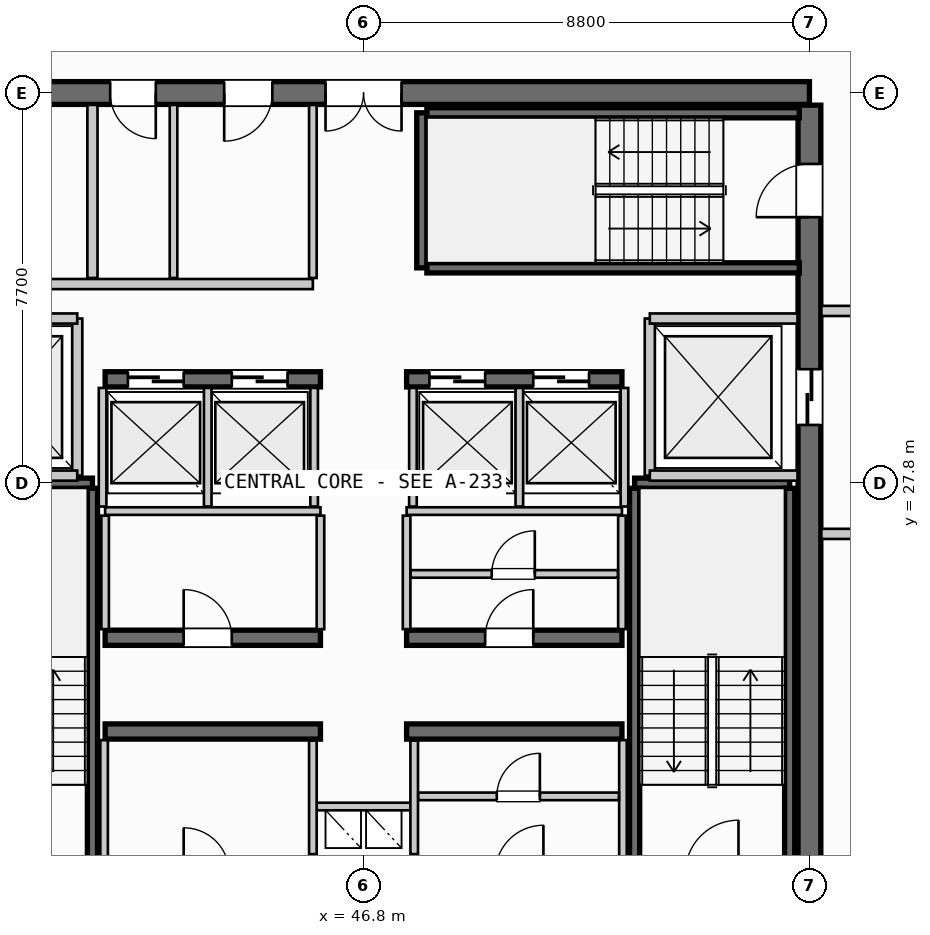
"""IFC4 building model, lengths in metres.
Left out: names, types, materials, properties, quantities, classifications, styles, units other than length and angle.
Written with IfcOpenShell. Run it as: python <this file> out.ifc"""

import sys

from ifc_helpers import new_model, si_unit, direction, frame, frame_2d, origin, place, context, subcontext, project, spatial, rectangle, extrude, source, transform, mapped, element, fill, save


model = new_model("IFC4")
c1 = context("Model", 3, precision=1e-05, world=origin(), true_north=direction((0.0, 1.0)))
c2 = subcontext(c1, "Body", "Model", "MODEL_VIEW")
j1 = project(units=[si_unit("LENGTHUNIT", "METRE"), si_unit("PLANEANGLEUNIT", "RADIAN")], contexts=[c1])
p1 = place(None, origin())
s1 = spatial("IfcSite", under=j1, at=p1, CompositionType="ELEMENT")
p2 = place(p1, origin())
s2 = spatial("IfcBuilding", under=s1, at=p2, CompositionType="ELEMENT")
p3 = place(p2, frame((0.0, 0.0, 238.75)))
s3 = spatial("IfcBuildingStorey", under=s2, at=p3, CompositionType="ELEMENT", Elevation=238.75)
p4 = place(p3, frame((55.6, 35.5, 0.0), z_axis=(0.0, 0.0, 1.0), x_axis=(-1.0, 0.0, 0.0)))
e1 = element("IfcWall", 1, at=p4, inside=s3, PredefinedType="SHEAR", context=c2, shape_type="SweptSolid", body=[
    extrude(rectangle(XDim=17.6, YDim=0.45, at=frame_2d((8.8, 0.0))), origin(), (0.0, 0.0, 1.0), 3.21),
])
p5 = place(p4, frame((8.05, 0.0, 0.0)))
e2 = element("IfcOpeningElement", 2, at=p5, cuts=e1, PredefinedType="OPENING", context=c2, shape_type="SweptSolid", body=[
    extrude(rectangle(XDim=1.5, YDim=2.2, at=frame_2d((0.75, 1.1))), frame((0.0, 0.235, 0.0), z_axis=(0.0, -1.0, 0.0), x_axis=(1.0, 0.0, 0.0)), (0.0, 0.0, 1.0), 0.47),
])
p6 = place(p4, frame((15.1, 0.0, 0.0)))
e3 = element("IfcOpeningElement", 3, at=p6, cuts=e1, PredefinedType="OPENING", context=c2, shape_type="SweptSolid", body=[
    extrude(rectangle(XDim=0.95, YDim=2.15, at=frame_2d((0.475, 1.075))), frame((0.0, 0.235, 0.0), z_axis=(0.0, -1.0, 0.0), x_axis=(1.0, 0.0, 0.0)), (0.0, 0.0, 1.0), 0.47),
])
p7 = place(p4, frame((12.9, 0.0, 0.0)))
e4 = element("IfcOpeningElement", 4, at=p7, cuts=e1, PredefinedType="OPENING", context=c2, shape_type="SweptSolid", body=[
    extrude(rectangle(XDim=0.9, YDim=2.15, at=frame_2d((0.45, 1.075))), frame((0.0, 0.235, 0.0), z_axis=(0.0, -1.0, 0.0), x_axis=(1.0, 0.0, 0.0)), (0.0, 0.0, 1.0), 0.47),
])
p8 = place(p4, frame((10.6, 0.0, 0.0)))
e5 = element("IfcOpeningElement", 5, at=p8, cuts=e1, PredefinedType="OPENING", context=c2, shape_type="SweptSolid", body=[
    extrude(rectangle(XDim=0.95, YDim=2.15, at=frame_2d((0.475, 1.075))), frame((0.0, 0.235, 0.0), z_axis=(0.0, -1.0, 0.0), x_axis=(1.0, 0.0, 0.0)), (0.0, 0.0, 1.0), 0.47),
])
p9 = place(p3, frame((55.6, 20.34, 0.0), z_axis=(0.0, 0.0, 1.0), x_axis=(0.0, 1.0, 0.0)))
e6 = element("IfcWall", 6, at=p9, inside=s3, PredefinedType="SHEAR", context=c2, shape_type="SweptSolid", body=[
    extrude(rectangle(XDim=14.92, YDim=0.45, at=frame_2d((7.46, 0.0))), origin(), (0.0, 0.0, 1.0), 3.21),
])
p10 = place(p9, frame((12.71, 0.0, 0.0)))
e7 = element("IfcOpeningElement", 7, at=p10, cuts=e6, PredefinedType="OPENING", context=c2, shape_type="SweptSolid", body=[
    extrude(rectangle(XDim=1.05, YDim=2.15, at=frame_2d((0.525, 1.075))), frame((0.0, 0.235, 0.0), z_axis=(0.0, -1.0, 0.0), x_axis=(1.0, 0.0, 0.0)), (0.0, 0.0, 1.0), 0.47),
])
p11 = place(p9, frame((8.61, 0.0, 0.0)))
e8 = element("IfcOpeningElement", 8, at=p11, cuts=e6, PredefinedType="OPENING", context=c2, shape_type="SweptSolid", body=[
    extrude(rectangle(XDim=1.1, YDim=2.2, at=frame_2d((0.55, 1.1))), frame((0.0, 0.235, 0.0), z_axis=(0.0, -1.0, 0.0), x_axis=(1.0, 0.0, 0.0)), (0.0, 0.0, 1.0), 0.47),
])
for number, where, z_axis, x_axis in (
    (9, (41.7, 22.9, 0.0), (0.0, 0.0, 1.0), (1.0, 0.0, 0.0)),
    (10, (47.65, 22.9, 0.0), (0.0, 0.0, 1.0), (1.0, 0.0, 0.0)),
):
    element("IfcWall", number, at=place(p3, frame(where, z_axis=z_axis, x_axis=x_axis)), inside=s3, PredefinedType="SHEAR", context=c2, shape_type="SweptSolid", body=[
        extrude(rectangle(XDim=4.25, YDim=0.3, at=frame_2d((2.125, 0.0))), origin(), (0.0, 0.0, 1.0), 3.21),
    ])
p12 = place(p3, frame((41.7, 24.75, 0.0), z_axis=(0.0, 0.0, 1.0), x_axis=(1.0, 0.0, 0.0)))
e11 = element("IfcWall", 11, at=p12, inside=s3, PredefinedType="SHEAR", context=c2, shape_type="SweptSolid", body=[
    extrude(rectangle(XDim=4.25, YDim=0.3, at=frame_2d((2.125, 0.0))), origin(), (0.0, 0.0, 1.0), 3.21),
])
p13 = place(p12, frame((1.55, 0.0, 0.0)))
e12 = element("IfcOpeningElement", 12, at=p13, cuts=e11, PredefinedType="OPENING", context=c2, shape_type="SweptSolid", body=[
    extrude(rectangle(XDim=0.95, YDim=2.15, at=frame_2d((0.475, 1.075))), frame((0.0, 0.16, 0.0), z_axis=(0.0, -1.0, 0.0), x_axis=(1.0, 0.0, 0.0)), (0.0, 0.0, 1.0), 0.32),
])
p14 = place(p3, frame((47.65, 24.75, 0.0), z_axis=(0.0, 0.0, 1.0), x_axis=(1.0, 0.0, 0.0)))
e13 = element("IfcWall", 13, at=p14, inside=s3, PredefinedType="SHEAR", context=c2, shape_type="SweptSolid", body=[
    extrude(rectangle(XDim=4.25, YDim=0.3, at=frame_2d((2.125, 0.0))), origin(), (0.0, 0.0, 1.0), 3.21),
])
p15 = place(p14, frame((1.55, 0.0, 0.0)))
e14 = element("IfcOpeningElement", 14, at=p15, cuts=e13, PredefinedType="OPENING", context=c2, shape_type="SweptSolid", body=[
    extrude(rectangle(XDim=0.95, YDim=2.15, at=frame_2d((0.475, 1.075))), frame((0.0, 0.16, 0.0), z_axis=(0.0, -1.0, 0.0), x_axis=(1.0, 0.0, 0.0)), (0.0, 0.0, 1.0), 0.32),
])
p16 = place(p3, frame((41.7, 29.85, 0.0), z_axis=(0.0, 0.0, 1.0), x_axis=(1.0, 0.0, 0.0)))
e15 = element("IfcWall", 15, at=p16, inside=s3, PredefinedType="SHEAR", context=c2, shape_type="SweptSolid", body=[
    extrude(rectangle(XDim=4.25, YDim=0.3, at=frame_2d((2.125, 0.0))), origin(), (0.0, 0.0, 1.0), 3.21),
])
p17 = place(p16, frame((0.45, 0.0, 0.0)))
e16 = element("IfcOpeningElement", 16, at=p17, cuts=e15, PredefinedType="OPENING", context=c2, shape_type="SweptSolid", body=[
    extrude(rectangle(XDim=1.1, YDim=2.2, at=frame_2d((0.55, 1.1))), frame((0.0, 0.16, 0.0), z_axis=(0.0, -1.0, 0.0), x_axis=(1.0, 0.0, 0.0)), (0.0, 0.0, 1.0), 0.32),
])
p18 = place(p16, frame((2.5, 0.0, 0.0)))
e17 = element("IfcOpeningElement", 17, at=p18, cuts=e15, PredefinedType="OPENING", context=c2, shape_type="SweptSolid", body=[
    extrude(rectangle(XDim=1.1, YDim=2.2, at=frame_2d((0.55, 1.1))), frame((0.0, 0.16, 0.0), z_axis=(0.0, -1.0, 0.0), x_axis=(1.0, 0.0, 0.0)), (0.0, 0.0, 1.0), 0.32),
])
p19 = place(p3, frame((47.65, 29.85, 0.0), z_axis=(0.0, 0.0, 1.0), x_axis=(1.0, 0.0, 0.0)))
e18 = element("IfcWall", 18, at=p19, inside=s3, PredefinedType="SHEAR", context=c2, shape_type="SweptSolid", body=[
    extrude(rectangle(XDim=4.25, YDim=0.3, at=frame_2d((2.125, 0.0))), origin(), (0.0, 0.0, 1.0), 3.21),
])
p20 = place(p19, frame((0.45, 0.0, 0.0)))
e19 = element("IfcOpeningElement", 19, at=p20, cuts=e18, PredefinedType="OPENING", context=c2, shape_type="SweptSolid", body=[
    extrude(rectangle(XDim=1.1, YDim=2.2, at=frame_2d((0.55, 1.1))), frame((0.0, 0.16, 0.0), z_axis=(0.0, -1.0, 0.0), x_axis=(1.0, 0.0, 0.0)), (0.0, 0.0, 1.0), 0.32),
])
p21 = place(p19, frame((2.5, 0.0, 0.0)))
e20 = element("IfcOpeningElement", 20, at=p21, cuts=e18, PredefinedType="OPENING", context=c2, shape_type="SweptSolid", body=[
    extrude(rectangle(XDim=1.1, YDim=2.2, at=frame_2d((0.55, 1.1))), frame((0.0, 0.16, 0.0), z_axis=(0.0, -1.0, 0.0), x_axis=(1.0, 0.0, 0.0)), (0.0, 0.0, 1.0), 0.32),
])
p22 = place(p3, frame((38.39, 27.8, 0.0), z_axis=(0.0, 0.0, 1.0), x_axis=(1.0, 0.0, 0.0)))
e21 = element("IfcWall", 21, at=p22, inside=s3, PredefinedType="SHEAR", context=c2, shape_type="SweptSolid", body=[
    extrude(rectangle(XDim=3.06, YDim=0.2, at=frame_2d((1.53, 0.0))), origin(), (0.0, 0.0, 1.0), 3.21),
])
p23 = place(p3, frame((41.45, 27.7, 0.0), z_axis=(0.0, 0.0, 1.0), x_axis=(0.0, -1.0, 0.0)))
e22 = element("IfcWall", 22, at=p23, inside=s3, PredefinedType="SHEAR", context=c2, shape_type="SweptSolid", body=[
    extrude(rectangle(XDim=7.35, YDim=0.2, at=frame_2d((3.675, 0.0))), origin(), (0.0, 0.0, 1.0), 3.21),
])
p24 = place(p3, frame((52.15, 27.8, 0.0), z_axis=(0.0, 0.0, 1.0), x_axis=(1.0, 0.0, 0.0)))
e23 = element("IfcWall", 23, at=p24, inside=s3, PredefinedType="SHEAR", context=c2, shape_type="SweptSolid", body=[
    extrude(rectangle(XDim=3.06, YDim=0.2, at=frame_2d((1.53, 0.0))), origin(), (0.0, 0.0, 1.0), 3.21),
])
for number, where, z_axis, x_axis in (
    (24, (55.21, 27.7, 0.0), (0.0, 0.0, 1.0), (0.0, -1.0, 0.0)),
    (25, (52.15, 20.35, 0.0), (0.0, 0.0, 1.0), (0.0, 1.0, 0.0)),
):
    element("IfcWall", number, at=place(p3, frame(where, z_axis=z_axis, x_axis=x_axis)), inside=s3, PredefinedType="SHEAR", context=c2, shape_type="SweptSolid", body=[
        extrude(rectangle(XDim=7.35, YDim=0.2, at=frame_2d((3.675, 0.0))), origin(), (0.0, 0.0, 1.0), 3.21),
    ])
p25 = place(p3, frame((47.95, 32.05, 0.0), z_axis=(0.0, 0.0, 1.0), x_axis=(0.0, 1.0, 0.0)))
e26 = element("IfcWall", 26, at=p25, inside=s3, PredefinedType="SHEAR", context=c2, shape_type="SweptSolid", body=[
    extrude(rectangle(XDim=3.06, YDim=0.2, at=frame_2d((1.53, 0.0))), origin(), (0.0, 0.0, 1.0), 3.21),
])
for number, where, z_axis, x_axis in (
    (27, (48.05, 35.11, 0.0), (0.0, 0.0, 1.0), (1.0, 0.0, 0.0)),
    (28, (55.4, 32.05, 0.0), (0.0, 0.0, 1.0), (-1.0, 0.0, 0.0)),
):
    element("IfcWall", number, at=place(p3, frame(where, z_axis=z_axis, x_axis=x_axis)), inside=s3, PredefinedType="SHEAR", context=c2, shape_type="SweptSolid", body=[
        extrude(rectangle(XDim=7.35, YDim=0.2, at=frame_2d((3.675, 0.0))), origin(), (0.0, 0.0, 1.0), 3.21),
    ])
p26 = place(p3, frame((45.8, 21.42, 0.0), z_axis=(0.0, 0.0, 1.0), x_axis=(1.0, 0.0, 0.0)))
e29 = element("IfcWall", 29, at=p26, inside=s3, PredefinedType="PARTITIONING", context=c2, shape_type="SweptSolid", body=[
    extrude(rectangle(XDim=2.0, YDim=0.15, at=frame_2d((1.0, 0.0))), origin(), (0.0, 0.0, 1.0), 2.28),
])
for number, where, z_axis, x_axis in (
    (30, (45.8, 20.48, 0.0), (0.0, 0.0, 1.0), (0.0, 1.0, 0.0)),
    (31, (47.8, 20.48, 0.0), (0.0, 0.0, 1.0), (0.0, 1.0, 0.0)),
):
    element("IfcWall", number, at=place(p3, frame(where, z_axis=z_axis, x_axis=x_axis)), inside=s3, PredefinedType="PARTITIONING", context=c2, shape_type="SweptSolid", body=[
        extrude(rectangle(XDim=2.24, YDim=0.15, at=frame_2d((1.12, 0.0))), origin(), (0.0, 0.0, 1.0), 2.28),
    ])
p27 = place(p3, frame((41.15, 27.95, 0.0), z_axis=(0.0, 0.0, 1.0), x_axis=(0.0, 1.0, 0.0)))
e32 = element("IfcWall", 32, at=p27, inside=s3, PredefinedType="PARTITIONING", context=c2, shape_type="SweptSolid", body=[
    extrude(rectangle(XDim=3.1, YDim=0.2, at=frame_2d((1.55, 0.0))), origin(), (0.0, 0.0, 1.0), 2.28),
])
for number, where, z_axis, x_axis in (
    (33, (38.235, 27.95, 0.0), (0.0, 0.0, 1.0), (1.0, 0.0, 0.0)),
    (34, (38.235, 31.05, 0.0), (0.0, 0.0, 1.0), (1.0, 0.0, 0.0)),
):
    element("IfcWall", number, at=place(p3, frame(where, z_axis=z_axis, x_axis=x_axis)), inside=s3, PredefinedType="PARTITIONING", context=c2, shape_type="SweptSolid", body=[
        extrude(rectangle(XDim=2.915, YDim=0.2, at=frame_2d((1.458, 0.0))), origin(), (0.0, 0.0, 1.0), 2.28),
    ])
p28 = place(p3, frame((52.45, 27.95, 0.0), z_axis=(0.0, 0.0, 1.0), x_axis=(0.0, 1.0, 0.0)))
e35 = element("IfcWall", 35, at=p28, inside=s3, PredefinedType="PARTITIONING", context=c2, shape_type="SweptSolid", body=[
    extrude(rectangle(XDim=3.1, YDim=0.2, at=frame_2d((1.55, 0.0))), origin(), (0.0, 0.0, 1.0), 2.28),
])
for number, where, z_axis, x_axis in (
    (36, (52.45, 27.95, 0.0), (0.0, 0.0, 1.0), (1.0, 0.0, 0.0)),
    (37, (52.45, 31.05, 0.0), (0.0, 0.0, 1.0), (1.0, 0.0, 0.0)),
):
    element("IfcWall", number, at=place(p3, frame(where, z_axis=z_axis, x_axis=x_axis)), inside=s3, PredefinedType="PARTITIONING", context=c2, shape_type="SweptSolid", body=[
        extrude(rectangle(XDim=2.915, YDim=0.2, at=frame_2d((1.458, 0.0))), origin(), (0.0, 0.0, 1.0), 2.28),
    ])
for number, where, z_axis, x_axis in (
    (38, (55.835, 26.8, 0.0), (0.0, 0.0, 1.0), (1.0, 0.0, 0.0)),
    (39, (55.835, 31.2, 0.0), (0.0, 0.0, 1.0), (1.0, 0.0, 0.0)),
):
    element("IfcWall", number, at=place(p3, frame(where, z_axis=z_axis, x_axis=x_axis)), inside=s3, PredefinedType="PARTITIONING", context=c2, shape_type="SweptSolid", body=[
        extrude(rectangle(XDim=3.265, YDim=0.2, at=frame_2d((1.633, 0.0))), origin(), (0.0, 0.0, 1.0), 2.28),
    ])
for number, where, z_axis, x_axis in (
    (40, (41.68, 20.335, 0.0), (0.0, 0.0, 1.0), (0.0, 1.0, 0.0)),
    (41, (51.92, 20.335, 0.0), (0.0, 0.0, 1.0), (0.0, 1.0, 0.0)),
):
    element("IfcWall", number, at=place(p3, frame(where, z_axis=z_axis, x_axis=x_axis)), inside=s3, PredefinedType="PARTITIONING", context=c2, shape_type="SweptSolid", body=[
        extrude(rectangle(XDim=2.395, YDim=0.15, at=frame_2d((1.198, 0.0))), origin(), (0.0, 0.0, 1.0), 2.28),
    ])
p29 = place(p3, frame((47.88, 21.62, 0.0), z_axis=(0.0, 0.0, 1.0), x_axis=(1.0, 0.0, 0.0)))
e42 = element("IfcWall", 42, at=p29, inside=s3, PredefinedType="PARTITIONING", context=c2, shape_type="SweptSolid", body=[
    extrude(rectangle(XDim=3.96, YDim=0.15, at=frame_2d((1.98, 0.0))), origin(), (0.0, 0.0, 1.0), 2.28),
])
p30 = place(p29, frame((1.55, 0.0, 0.0)))
e43 = element("IfcOpeningElement", 43, at=p30, cuts=e42, PredefinedType="OPENING", context=c2, shape_type="SweptSolid", body=[
    extrude(rectangle(XDim=0.85, YDim=2.15, at=frame_2d((0.425, 1.075))), frame((0.0, 0.085, 0.0), z_axis=(0.0, -1.0, 0.0), x_axis=(1.0, 0.0, 0.0)), (0.0, 0.0, 1.0), 0.17),
])
for number, where, z_axis, x_axis in (
    (44, (41.7, 27.25, 0.0), (0.0, 0.0, 1.0), (1.0, 0.0, 0.0)),
    (45, (47.65, 27.25, 0.0), (0.0, 0.0, 1.0), (1.0, 0.0, 0.0)),
):
    element("IfcWall", number, at=place(p3, frame(where, z_axis=z_axis, x_axis=x_axis)), inside=s3, PredefinedType="PARTITIONING", context=c2, shape_type="SweptSolid", body=[
        extrude(rectangle(XDim=4.25, YDim=0.15, at=frame_2d((2.125, 0.0))), origin(), (0.0, 0.0, 1.0), 2.28),
    ])
for number, where, z_axis, x_axis in (
    (46, (41.7, 24.92, 0.0), (0.0, 0.0, 1.0), (0.0, 1.0, 0.0)),
    (47, (45.95, 24.92, 0.0), (0.0, 0.0, 1.0), (0.0, 1.0, 0.0)),
    (48, (47.65, 24.92, 0.0), (0.0, 0.0, 1.0), (0.0, 1.0, 0.0)),
    (49, (51.9, 24.92, 0.0), (0.0, 0.0, 1.0), (0.0, 1.0, 0.0)),
):
    element("IfcWall", number, at=place(p3, frame(where, z_axis=z_axis, x_axis=x_axis)), inside=s3, PredefinedType="PARTITIONING", context=c2, shape_type="SweptSolid", body=[
        extrude(rectangle(XDim=2.24, YDim=0.15, at=frame_2d((1.12, 0.0))), origin(), (0.0, 0.0, 1.0), 2.28),
    ])
p31 = place(p3, frame((47.73, 26.01, 0.0), z_axis=(0.0, 0.0, 1.0), x_axis=(1.0, 0.0, 0.0)))
e50 = element("IfcWall", 50, at=p31, inside=s3, PredefinedType="PARTITIONING", context=c2, shape_type="SweptSolid", body=[
    extrude(rectangle(XDim=4.09, YDim=0.15, at=frame_2d((2.045, 0.0))), origin(), (0.0, 0.0, 1.0), 2.28),
])
p32 = place(p31, frame((1.6, 0.0, 0.0)))
e51 = element("IfcOpeningElement", 51, at=p32, cuts=e50, PredefinedType="OPENING", context=c2, shape_type="SweptSolid", body=[
    extrude(rectangle(XDim=0.85, YDim=2.15, at=frame_2d((0.425, 1.075))), frame((0.0, 0.085, 0.0), z_axis=(0.0, -1.0, 0.0), x_axis=(1.0, 0.0, 0.0)), (0.0, 0.0, 1.0), 0.17),
])
for number, where, z_axis, x_axis in (
    (52, (41.65, 27.34, 0.0), (0.0, 0.0, 1.0), (0.0, 1.0, 0.0)),
    (53, (43.725, 27.34, 0.0), (0.0, 0.0, 1.0), (0.0, 1.0, 0.0)),
    (54, (45.825, 27.34, 0.0), (0.0, 0.0, 1.0), (0.0, 1.0, 0.0)),
    (55, (47.775, 27.34, 0.0), (0.0, 0.0, 1.0), (0.0, 1.0, 0.0)),
    (56, (49.875, 27.34, 0.0), (0.0, 0.0, 1.0), (0.0, 1.0, 0.0)),
    (57, (51.95, 27.34, 0.0), (0.0, 0.0, 1.0), (0.0, 1.0, 0.0)),
):
    element("IfcWall", number, at=place(p3, frame(where, z_axis=z_axis, x_axis=x_axis)), inside=s3, PredefinedType="PARTITIONING", context=c2, shape_type="SweptSolid", body=[
        extrude(rectangle(XDim=2.34, YDim=0.15, at=frame_2d((1.17, 0.0))), origin(), (0.0, 0.0, 1.0), 2.28),
    ])
p33 = place(p3, frame((41.45, 31.85, 0.0), z_axis=(0.0, 0.0, 1.0), x_axis=(0.0, 1.0, 0.0)))
e58 = element("IfcWall", 58, at=p33, inside=s3, PredefinedType="PARTITIONING", context=c2, shape_type="SweptSolid", body=[
    extrude(rectangle(XDim=3.415, YDim=0.2, at=frame_2d((1.708, 0.0))), origin(), (0.0, 0.0, 1.0), 2.28),
])
p34 = place(p3, frame((38.235, 31.73, 0.0), z_axis=(0.0, 0.0, 1.0), x_axis=(1.0, 0.0, 0.0)))
e59 = element("IfcWall", 59, at=p34, inside=s3, PredefinedType="PARTITIONING", context=c2, shape_type="SweptSolid", body=[
    extrude(rectangle(XDim=7.565, YDim=0.2, at=frame_2d((3.782, 0.0))), origin(), (0.0, 0.0, 1.0), 2.28),
])
p35 = place(p3, frame((45.8, 31.85, 0.0), z_axis=(0.0, 0.0, 1.0), x_axis=(0.0, 1.0, 0.0)))
e60 = element("IfcWall", 60, at=p35, inside=s3, PredefinedType="PARTITIONING", context=c2, shape_type="SweptSolid", body=[
    extrude(rectangle(XDim=3.415, YDim=0.15, at=frame_2d((1.708, 0.0))), origin(), (0.0, 0.0, 1.0), 2.28),
])
p36 = place(p3, frame((43.05, 31.85, 0.0), z_axis=(0.0, 0.0, 1.0), x_axis=(0.0, 1.0, 0.0)))
e61 = element("IfcWall", 61, at=p36, inside=s3, PredefinedType="PLUMBINGWALL", context=c2, shape_type="SweptSolid", body=[
    extrude(rectangle(XDim=3.415, YDim=0.15, at=frame_2d((1.708, 0.0))), origin(), (0.0, 0.0, 1.0), 2.28),
])
m1 = source(origin(), c2, "Body", "SweptSolid", [
    extrude(rectangle(XDim=1.05, YDim=2.15, at=frame_2d((0.525, 1.075))), frame((0.0, 0.025, 0.0), z_axis=(0.0, -1.0, 0.0), x_axis=(1.0, 0.0, 0.0)), (0.0, 0.0, 1.0), 0.05),
])
p37 = place(p10, origin())
e62 = element("IfcDoor", 62, at=p37, inside=s3, OperationType="SINGLE_SWING_LEFT", PredefinedType="DOOR", context=c2, shape_type="MappedRepresentation", body=[
    mapped(m1, transform((0.0, 0.0, 0.0), scale=1.0)),
])
fill(e7, e62)
m2 = source(origin(), c2, "Body", "SweptSolid", [
    extrude(rectangle(XDim=1.5, YDim=2.2, at=frame_2d((0.75, 1.1))), frame((0.0, 0.025, 0.0), z_axis=(0.0, -1.0, 0.0), x_axis=(1.0, 0.0, 0.0)), (0.0, 0.0, 1.0), 0.05),
])
p38 = place(p5, origin())
e63 = element("IfcDoor", 63, at=p38, inside=s3, OperationType="DOUBLE_DOOR_SINGLE_SWING", PredefinedType="DOOR", context=c2, shape_type="MappedRepresentation", body=[
    mapped(m2, transform((0.0, 0.0, 0.0), scale=1.0)),
])
fill(e2, e63)
m3 = source(origin(), c2, "Body", "SweptSolid", [
    extrude(rectangle(XDim=1.1, YDim=2.2, at=frame_2d((0.55, 1.1))), frame((0.0, 0.025, 0.0), z_axis=(0.0, -1.0, 0.0), x_axis=(1.0, 0.0, 0.0)), (0.0, 0.0, 1.0), 0.05),
])
p39 = place(p11, origin())
e64 = element("IfcDoor", 64, at=p39, inside=s3, OperationType="SLIDING_TO_RIGHT", PredefinedType="DOOR", context=c2, shape_type="MappedRepresentation", body=[
    mapped(m3, transform((0.0, 0.0, 0.0), scale=1.0)),
])
fill(e8, e64)
m4 = source(origin(), c2, "Body", "SweptSolid", [
    extrude(rectangle(XDim=0.95, YDim=2.15, at=frame_2d((0.475, 1.075))), frame((0.0, 0.025, 0.0), z_axis=(0.0, -1.0, 0.0), x_axis=(1.0, 0.0, 0.0)), (0.0, 0.0, 1.0), 0.05),
])
p40 = place(p13, origin())
e65 = element("IfcDoor", 65, at=p40, inside=s3, OperationType="SINGLE_SWING_LEFT", PredefinedType="DOOR", context=c2, shape_type="MappedRepresentation", body=[
    mapped(m4, transform((0.0, 0.0, 0.0), scale=1.0)),
])
fill(e12, e65)
p41 = place(p15, origin())
e66 = element("IfcDoor", 66, at=p41, inside=s3, OperationType="SINGLE_SWING_RIGHT", PredefinedType="DOOR", context=c2, shape_type="MappedRepresentation", body=[
    mapped(m4, transform((0.0, 0.0, 0.0), scale=1.0)),
])
fill(e14, e66)
p42 = place(p17, origin())
e67 = element("IfcDoor", 67, at=p42, inside=s3, OperationType="SLIDING_TO_LEFT", PredefinedType="DOOR", context=c2, shape_type="MappedRepresentation", body=[
    mapped(m3, transform((0.0, 0.0, 0.0), scale=1.0)),
])
fill(e16, e67)
p43 = place(p18, origin())
e68 = element("IfcDoor", 68, at=p43, inside=s3, OperationType="SLIDING_TO_LEFT", PredefinedType="DOOR", context=c2, shape_type="MappedRepresentation", body=[
    mapped(m3, transform((0.0, 0.0, 0.0), scale=1.0)),
])
fill(e17, e68)
p44 = place(p20, origin())
e69 = element("IfcDoor", 69, at=p44, inside=s3, OperationType="SLIDING_TO_LEFT", PredefinedType="DOOR", context=c2, shape_type="MappedRepresentation", body=[
    mapped(m3, transform((0.0, 0.0, 0.0), scale=1.0)),
])
fill(e19, e69)
p45 = place(p21, origin())
e70 = element("IfcDoor", 70, at=p45, inside=s3, OperationType="SLIDING_TO_LEFT", PredefinedType="DOOR", context=c2, shape_type="MappedRepresentation", body=[
    mapped(m3, transform((0.0, 0.0, 0.0), scale=1.0)),
])
fill(e20, e70)
m5 = source(origin(), c2, "Body", "SweptSolid", [
    extrude(rectangle(XDim=0.9, YDim=2.15, at=frame_2d((0.45, 1.075))), frame((0.0, 0.025, 0.0), z_axis=(0.0, -1.0, 0.0), x_axis=(1.0, 0.0, 0.0)), (0.0, 0.0, 1.0), 0.05),
])
p46 = place(p7, origin())
e71 = element("IfcDoor", 71, at=p46, inside=s3, OperationType="SINGLE_SWING_LEFT", PredefinedType="DOOR", context=c2, shape_type="MappedRepresentation", body=[
    mapped(m5, transform((0.0, 0.0, 0.0), scale=1.0)),
])
fill(e4, e71)
p47 = place(p8, origin())
e72 = element("IfcDoor", 72, at=p47, inside=s3, OperationType="SINGLE_SWING_RIGHT", PredefinedType="DOOR", context=c2, shape_type="MappedRepresentation", body=[
    mapped(m4, transform((0.0, 0.0, 0.0), scale=1.0)),
])
fill(e5, e72)
m6 = source(origin(), c2, "Body", "SweptSolid", [
    extrude(rectangle(XDim=0.85, YDim=2.15, at=frame_2d((0.425, 1.075))), frame((0.0, 0.025, 0.0), z_axis=(0.0, -1.0, 0.0), x_axis=(1.0, 0.0, 0.0)), (0.0, 0.0, 1.0), 0.05),
])
p48 = place(p30, origin())
e73 = element("IfcDoor", 73, at=p48, inside=s3, OperationType="SINGLE_SWING_RIGHT", PredefinedType="DOOR", context=c2, shape_type="MappedRepresentation", body=[
    mapped(m6, transform((0.0, 0.0, 0.0), scale=1.0)),
])
fill(e43, e73)
p49 = place(p32, origin())
e74 = element("IfcDoor", 74, at=p49, inside=s3, OperationType="SINGLE_SWING_RIGHT", PredefinedType="DOOR", context=c2, shape_type="MappedRepresentation", body=[
    mapped(m6, transform((0.0, 0.0, 0.0), scale=1.0)),
])
fill(e51, e74)
save(model, sys.argv[1])
